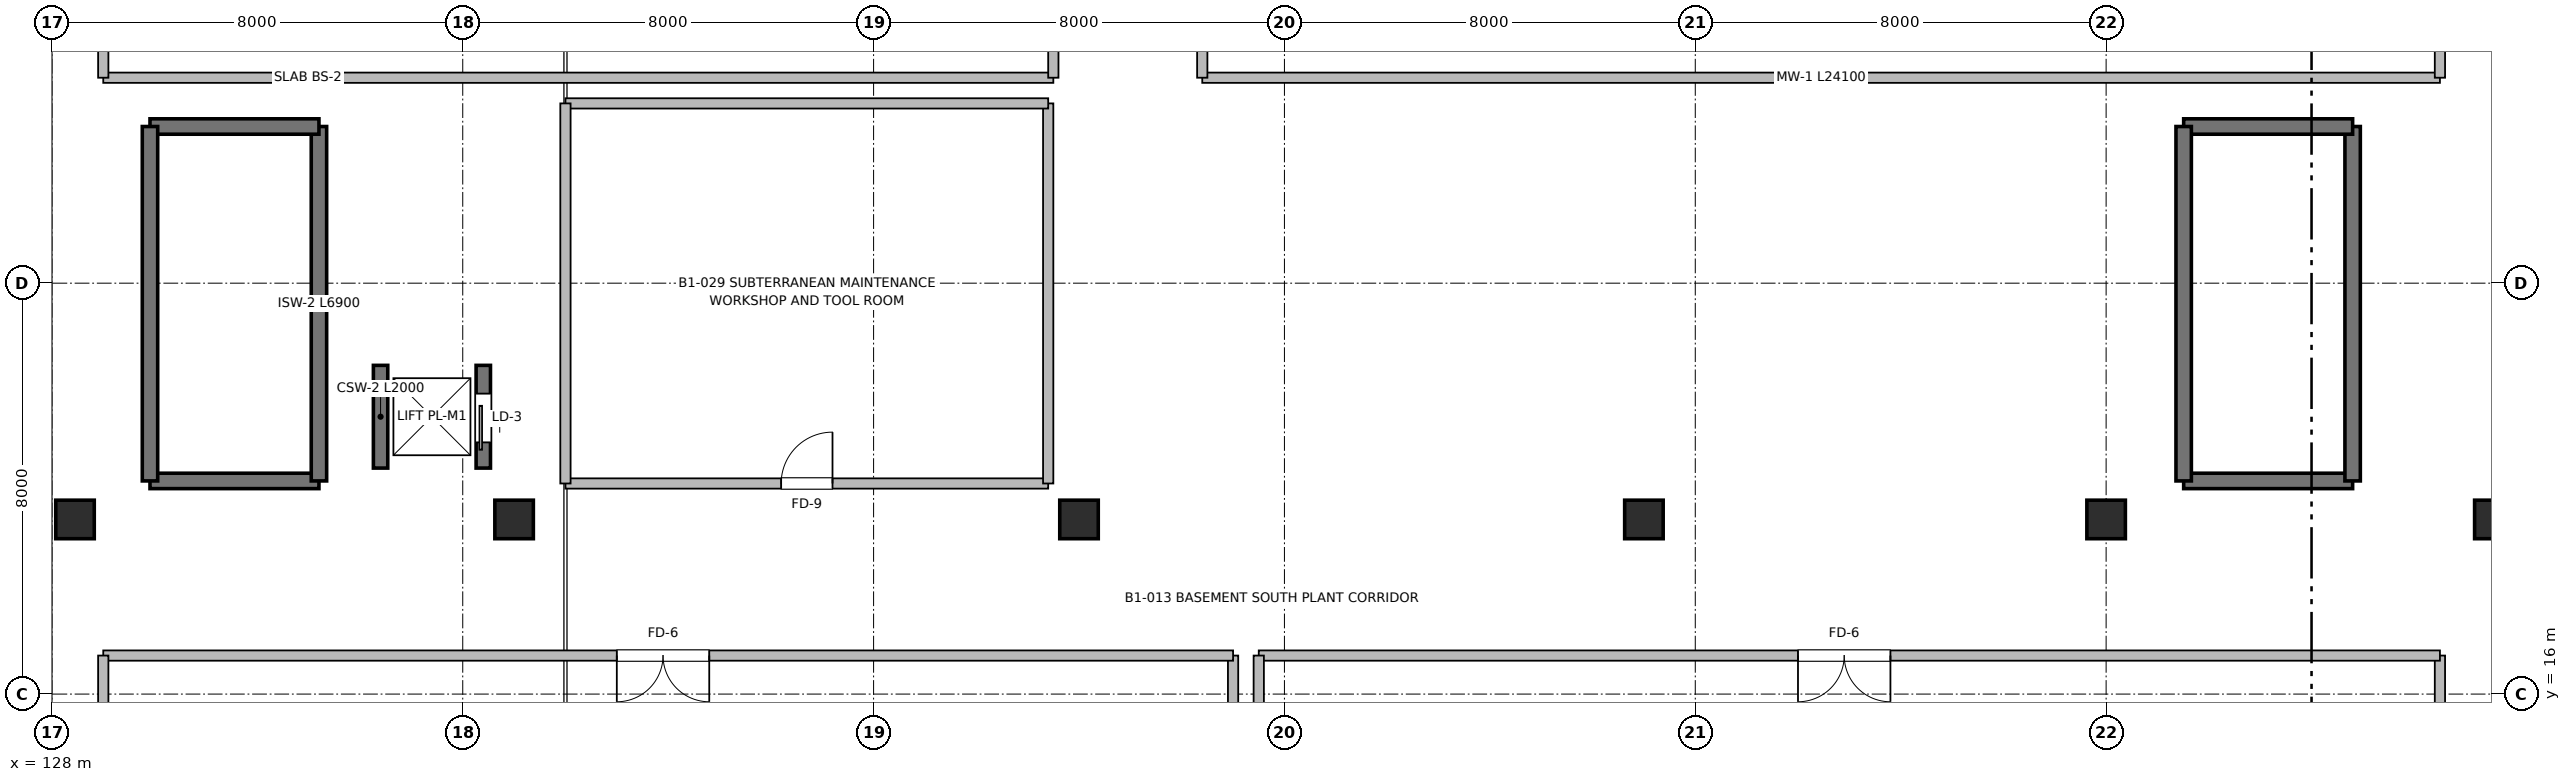
"""IFC4 building model, lengths in metres.
Left out: names, types, materials, properties, quantities, classifications, styles, units other than length and angle.
Written with IfcOpenShell. Run it as: python <this file> out.ifc"""

import sys

from ifc_helpers import new_model, si_unit, direction, frame, frame_2d, origin, origin_2d, place, context, subcontext, project, spatial, rectangle, extrude, element, fill, save


model = new_model("IFC4")
c1 = context("Model", 3, precision=1e-05, world=origin(), true_north=direction((0.0, 1.0)))
c2 = subcontext(c1, "Body", "Model", "MODEL_VIEW")
j1 = project(units=[si_unit("LENGTHUNIT", "METRE"), si_unit("PLANEANGLEUNIT", "RADIAN")], contexts=[c1])
p1 = place(None, origin())
s1 = spatial("IfcSite", under=j1, at=p1, CompositionType="ELEMENT")
p2 = place(p1, origin())
s2 = spatial("IfcBuilding", under=s1, at=p2, CompositionType="ELEMENT")
p3 = place(p2, frame((0.0, 0.0, -3.84)))
s3 = spatial("IfcBuildingStorey", under=s2, at=p3, CompositionType="ELEMENT", Elevation=-3.84)
for number, where, z_axis, x_axis in (
    (1, (128.45, 19.4, 0.0), (0.0, 0.0, 1.0), (1.0, 0.0, 0.0)),
    (2, (137.0, 19.4, 0.0), (0.0, 0.0, 1.0), (1.0, 0.0, 0.0)),
    (3, (148.0, 19.4, 0.0), (0.0, 0.0, 1.0), (1.0, 0.0, 0.0)),
    (4, (159.0, 19.4, 0.0), (0.0, 0.0, 1.0), (1.0, 0.0, 0.0)),
    (5, (168.0, 19.4, 0.0), (0.0, 0.0, 1.0), (1.0, 0.0, 0.0)),
    (6, (175.55, 19.4, 0.0), (0.0, 0.0, 1.0), (1.0, 0.0, 0.0)),
):
    element("IfcColumn", number, at=place(p3, frame(where, z_axis=z_axis, x_axis=x_axis)), inside=s3, PredefinedType="COLUMN", context=c2, shape_type="SweptSolid", body=[
        extrude(rectangle(XDim=0.75, YDim=0.75, at=origin_2d()), origin(), (0.0, 0.0, 1.0), 3.84),
    ])
p4 = place(p3, frame((136.4, 20.4, 0.0), z_axis=(0.0, 0.0, 1.0), x_axis=(0.0, 1.0, 0.0)))
e7 = element("IfcWall", 7, at=p4, inside=s3, PredefinedType="SHEAR", context=c2, shape_type="SweptSolid", body=[
    extrude(rectangle(XDim=2.0, YDim=0.28, at=frame_2d((1.0, 0.0))), origin(), (0.0, 0.0, 1.0), 3.52),
])
p5 = place(p4, frame((0.5, 0.0, 0.0)))
e8 = element("IfcOpeningElement", 8, at=p5, cuts=e7, PredefinedType="OPENING", context=c2, shape_type="SweptSolid", body=[
    extrude(rectangle(XDim=0.95, YDim=2.15, at=frame_2d((0.475, 1.075))), frame((0.0, 0.15, 0.0), z_axis=(0.0, -1.0, 0.0), x_axis=(1.0, 0.0, 0.0)), (0.0, 0.0, 1.0), 0.3),
])
p6 = place(p3, frame((134.4, 20.4, 0.0), z_axis=(0.0, 0.0, 1.0), x_axis=(0.0, 1.0, 0.0)))
e9 = element("IfcWall", 9, at=p6, inside=s3, PredefinedType="SHEAR", context=c2, shape_type="SweptSolid", body=[
    extrude(rectangle(XDim=2.0, YDim=0.28, at=frame_2d((1.0, 0.0))), origin(), (0.0, 0.0, 1.0), 3.52),
])
p7 = place(p3, frame((133.2, 20.15, 0.0), z_axis=(0.0, 0.0, 1.0), x_axis=(-1.0, 0.0, 0.0)))
e10 = element("IfcWall", 10, at=p7, inside=s3, PredefinedType="SHEAR", context=c2, shape_type="SweptSolid", body=[
    extrude(rectangle(XDim=3.29, YDim=0.3, at=frame_2d((1.645, 0.0))), origin(), (0.0, 0.0, 1.0), 3.84),
])
p8 = place(p3, frame((133.2, 27.05, 0.0), z_axis=(0.0, 0.0, 1.0), x_axis=(0.0, -1.0, 0.0)))
e11 = element("IfcWall", 11, at=p8, inside=s3, PredefinedType="SHEAR", context=c2, shape_type="SweptSolid", body=[
    extrude(rectangle(XDim=6.9, YDim=0.3, at=frame_2d((3.45, 0.0))), origin(), (0.0, 0.0, 1.0), 3.84),
])
p9 = place(p3, frame((129.91, 27.05, 0.0), z_axis=(0.0, 0.0, 1.0), x_axis=(1.0, 0.0, 0.0)))
e12 = element("IfcWall", 12, at=p9, inside=s3, PredefinedType="SHEAR", context=c2, shape_type="SweptSolid", body=[
    extrude(rectangle(XDim=3.29, YDim=0.3, at=frame_2d((1.645, 0.0))), origin(), (0.0, 0.0, 1.0), 3.84),
])
p10 = place(p3, frame((129.91, 20.15, 0.0), z_axis=(0.0, 0.0, 1.0), x_axis=(0.0, 1.0, 0.0)))
e13 = element("IfcWall", 13, at=p10, inside=s3, PredefinedType="SHEAR", context=c2, shape_type="SweptSolid", body=[
    extrude(rectangle(XDim=6.9, YDim=0.3, at=frame_2d((3.45, 0.0))), origin(), (0.0, 0.0, 1.0), 3.84),
])
p11 = place(p3, frame((172.8, 20.15, 0.0), z_axis=(0.0, 0.0, 1.0), x_axis=(-1.0, 0.0, 0.0)))
e14 = element("IfcWall", 14, at=p11, inside=s3, PredefinedType="SHEAR", context=c2, shape_type="SweptSolid", body=[
    extrude(rectangle(XDim=3.29, YDim=0.3, at=frame_2d((1.645, 0.0))), origin(), (0.0, 0.0, 1.0), 3.84),
])
p12 = place(p3, frame((172.8, 27.05, 0.0), z_axis=(0.0, 0.0, 1.0), x_axis=(0.0, -1.0, 0.0)))
e15 = element("IfcWall", 15, at=p12, inside=s3, PredefinedType="SHEAR", context=c2, shape_type="SweptSolid", body=[
    extrude(rectangle(XDim=6.9, YDim=0.3, at=frame_2d((3.45, 0.0))), origin(), (0.0, 0.0, 1.0), 3.84),
])
p13 = place(p3, frame((169.51, 27.05, 0.0), z_axis=(0.0, 0.0, 1.0), x_axis=(1.0, 0.0, 0.0)))
e16 = element("IfcWall", 16, at=p13, inside=s3, PredefinedType="SHEAR", context=c2, shape_type="SweptSolid", body=[
    extrude(rectangle(XDim=3.29, YDim=0.3, at=frame_2d((1.645, 0.0))), origin(), (0.0, 0.0, 1.0), 3.84),
])
p14 = place(p3, frame((169.51, 20.15, 0.0), z_axis=(0.0, 0.0, 1.0), x_axis=(0.0, 1.0, 0.0)))
e17 = element("IfcWall", 17, at=p14, inside=s3, PredefinedType="SHEAR", context=c2, shape_type="SweptSolid", body=[
    extrude(rectangle(XDim=6.9, YDim=0.3, at=frame_2d((3.45, 0.0))), origin(), (0.0, 0.0, 1.0), 3.84),
])
p15 = place(p3, frame((151.0, 1.5, 0.0), z_axis=(0.0, 0.0, 1.0), x_axis=(0.0, 1.0, 0.0)))
e18 = element("IfcWall", 18, at=p15, inside=s3, PredefinedType="SOLIDWALL", context=c2, shape_type="SweptSolid", body=[
    extrude(rectangle(XDim=15.25, YDim=0.2, at=frame_2d((7.625, 0.0))), origin(), (0.0, 0.0, 1.0), 3.52),
])
p16 = place(p3, frame((151.0, 16.75, 0.0), z_axis=(0.0, 0.0, 1.0), x_axis=(-1.0, 0.0, 0.0)))
e19 = element("IfcWall", 19, at=p16, inside=s3, PredefinedType="SOLIDWALL", context=c2, shape_type="SweptSolid", body=[
    extrude(rectangle(XDim=22.0, YDim=0.2, at=frame_2d((11.0, 0.0))), origin(), (0.0, 0.0, 1.0), 3.52),
])
p17 = place(p16, frame((10.2, 0.0, 0.0)))
e20 = element("IfcOpeningElement", 20, at=p17, cuts=e19, PredefinedType="OPENING", context=c2, shape_type="SweptSolid", body=[
    extrude(rectangle(XDim=1.8, YDim=2.25, at=frame_2d((0.9, 1.125))), frame((0.0, 0.11, 0.0), z_axis=(0.0, -1.0, 0.0), x_axis=(1.0, 0.0, 0.0)), (0.0, 0.0, 1.0), 0.22),
])
for number, where, z_axis, x_axis in (
    (21, (129.0, 16.75, 0.0), (0.0, 0.0, 1.0), (0.0, -1.0, 0.0)),
    (22, (174.5, 1.5, 0.0), (0.0, 0.0, 1.0), (0.0, 1.0, 0.0)),
):
    element("IfcWall", number, at=place(p3, frame(where, z_axis=z_axis, x_axis=x_axis)), inside=s3, PredefinedType="SOLIDWALL", context=c2, shape_type="SweptSolid", body=[
        extrude(rectangle(XDim=15.25, YDim=0.2, at=frame_2d((7.625, 0.0))), origin(), (0.0, 0.0, 1.0), 3.52),
    ])
p18 = place(p3, frame((174.5, 16.75, 0.0), z_axis=(0.0, 0.0, 1.0), x_axis=(-1.0, 0.0, 0.0)))
e23 = element("IfcWall", 23, at=p18, inside=s3, PredefinedType="SOLIDWALL", context=c2, shape_type="SweptSolid", body=[
    extrude(rectangle(XDim=23.0, YDim=0.2, at=frame_2d((11.5, 0.0))), origin(), (0.0, 0.0, 1.0), 3.52),
])
p19 = place(p18, frame((10.7, 0.0, 0.0)))
e24 = element("IfcOpeningElement", 24, at=p19, cuts=e23, PredefinedType="OPENING", context=c2, shape_type="SweptSolid", body=[
    extrude(rectangle(XDim=1.8, YDim=2.25, at=frame_2d((0.9, 1.125))), frame((0.0, 0.11, 0.0), z_axis=(0.0, -1.0, 0.0), x_axis=(1.0, 0.0, 0.0)), (0.0, 0.0, 1.0), 0.22),
])
p20 = place(p3, frame((151.5, 16.75, 0.0), z_axis=(0.0, 0.0, 1.0), x_axis=(0.0, -1.0, 0.0)))
e25 = element("IfcWall", 25, at=p20, inside=s3, PredefinedType="SOLIDWALL", context=c2, shape_type="SweptSolid", body=[
    extrude(rectangle(XDim=15.25, YDim=0.2, at=frame_2d((7.625, 0.0))), origin(), (0.0, 0.0, 1.0), 3.52),
])
p21 = place(p3, frame((150.4, 28.0, 0.0), z_axis=(0.0, 0.0, 1.0), x_axis=(1.0, 0.0, 0.0)))
e26 = element("IfcWall", 26, at=p21, inside=s3, PredefinedType="SOLIDWALL", context=c2, shape_type="SweptSolid", body=[
    extrude(rectangle(XDim=24.1, YDim=0.2, at=frame_2d((12.05, 0.0))), origin(), (0.0, 0.0, 1.0), 3.52),
])
for number, where, z_axis, x_axis in (
    (27, (174.5, 28.0, 0.0), (0.0, 0.0, 1.0), (0.0, 1.0, 0.0)),
    (28, (150.4, 54.0, 0.0), (0.0, 0.0, 1.0), (0.0, -1.0, 0.0)),
):
    element("IfcWall", number, at=place(p3, frame(where, z_axis=z_axis, x_axis=x_axis)), inside=s3, PredefinedType="SOLIDWALL", context=c2, shape_type="SweptSolid", body=[
        extrude(rectangle(XDim=26.0, YDim=0.2, at=frame_2d((13.0, 0.0))), origin(), (0.0, 0.0, 1.0), 3.52),
    ])
p22 = place(p3, frame((129.0, 28.0, 0.0), z_axis=(0.0, 0.0, 1.0), x_axis=(1.0, 0.0, 0.0)))
e29 = element("IfcWall", 29, at=p22, inside=s3, PredefinedType="SOLIDWALL", context=c2, shape_type="SweptSolid", body=[
    extrude(rectangle(XDim=18.5, YDim=0.2, at=frame_2d((9.25, 0.0))), origin(), (0.0, 0.0, 1.0), 3.52),
])
for number, where, z_axis, x_axis in (
    (30, (147.5, 28.0, 0.0), (0.0, 0.0, 1.0), (0.0, 1.0, 0.0)),
    (31, (129.0, 54.0, 0.0), (0.0, 0.0, 1.0), (0.0, -1.0, 0.0)),
):
    element("IfcWall", number, at=place(p3, frame(where, z_axis=z_axis, x_axis=x_axis)), inside=s3, PredefinedType="SOLIDWALL", context=c2, shape_type="SweptSolid", body=[
        extrude(rectangle(XDim=26.0, YDim=0.2, at=frame_2d((13.0, 0.0))), origin(), (0.0, 0.0, 1.0), 3.52),
    ])
p23 = place(p3, frame((138.0, 20.1, 0.0), z_axis=(0.0, 0.0, 1.0), x_axis=(1.0, 0.0, 0.0)))
e32 = element("IfcWall", 32, at=p23, inside=s3, PredefinedType="SOLIDWALL", context=c2, shape_type="SweptSolid", body=[
    extrude(rectangle(XDim=9.4, YDim=0.2, at=frame_2d((4.7, 0.0))), origin(), (0.0, 0.0, 1.0), 3.52),
])
p24 = place(p23, frame((4.2, 0.0, 0.0)))
e33 = element("IfcOpeningElement", 33, at=p24, cuts=e32, PredefinedType="OPENING", context=c2, shape_type="SweptSolid", body=[
    extrude(rectangle(XDim=1.0, YDim=2.1, at=frame_2d((0.5, 1.05))), frame((0.0, 0.11, 0.0), z_axis=(0.0, -1.0, 0.0), x_axis=(1.0, 0.0, 0.0)), (0.0, 0.0, 1.0), 0.22),
])
p25 = place(p3, frame((147.4, 20.1, 0.0), z_axis=(0.0, 0.0, 1.0), x_axis=(0.0, 1.0, 0.0)))
e34 = element("IfcWall", 34, at=p25, inside=s3, PredefinedType="SOLIDWALL", context=c2, shape_type="SweptSolid", body=[
    extrude(rectangle(XDim=7.4, YDim=0.2, at=frame_2d((3.7, 0.0))), origin(), (0.0, 0.0, 1.0), 3.52),
])
p26 = place(p3, frame((147.4, 27.5, 0.0), z_axis=(0.0, 0.0, 1.0), x_axis=(-1.0, 0.0, 0.0)))
e35 = element("IfcWall", 35, at=p26, inside=s3, PredefinedType="SOLIDWALL", context=c2, shape_type="SweptSolid", body=[
    extrude(rectangle(XDim=9.4, YDim=0.2, at=frame_2d((4.7, 0.0))), origin(), (0.0, 0.0, 1.0), 3.52),
])
p27 = place(p3, frame((138.0, 27.5, 0.0), z_axis=(0.0, 0.0, 1.0), x_axis=(0.0, -1.0, 0.0)))
e36 = element("IfcWall", 36, at=p27, inside=s3, PredefinedType="SOLIDWALL", context=c2, shape_type="SweptSolid", body=[
    extrude(rectangle(XDim=7.4, YDim=0.2, at=frame_2d((3.7, 0.0))), origin(), (0.0, 0.0, 1.0), 3.52),
])
p28 = place(p5, origin())
e37 = element("IfcDoor", 37, at=p28, inside=s3, OperationType="SLIDING_TO_LEFT", PredefinedType="DOOR", context=c2, shape_type="SweptSolid", body=[
    extrude(rectangle(XDim=0.95, YDim=2.15, at=frame_2d((0.475, 1.075))), frame((0.0, 0.025, 0.0), z_axis=(0.0, -1.0, 0.0), x_axis=(1.0, 0.0, 0.0)), (0.0, 0.0, 1.0), 0.05),
])
fill(e8, e37)
p29 = place(p17, origin())
e38 = element("IfcDoor", 38, at=p29, inside=s3, OperationType="DOUBLE_DOOR_SINGLE_SWING", PredefinedType="DOOR", context=c2, shape_type="SweptSolid", body=[
    extrude(rectangle(XDim=1.8, YDim=2.25, at=frame_2d((0.9, 1.125))), frame((0.0, 0.025, 0.0), z_axis=(0.0, -1.0, 0.0), x_axis=(1.0, 0.0, 0.0)), (0.0, 0.0, 1.0), 0.05),
])
fill(e20, e38)
p30 = place(p19, origin())
e39 = element("IfcDoor", 39, at=p30, inside=s3, OperationType="DOUBLE_DOOR_SINGLE_SWING", PredefinedType="DOOR", context=c2, shape_type="SweptSolid", body=[
    extrude(rectangle(XDim=1.8, YDim=2.25, at=frame_2d((0.9, 1.125))), frame((0.0, 0.025, 0.0), z_axis=(0.0, -1.0, 0.0), x_axis=(1.0, 0.0, 0.0)), (0.0, 0.0, 1.0), 0.05),
])
fill(e24, e39)
p31 = place(p24, origin())
e40 = element("IfcDoor", 40, at=p31, inside=s3, OperationType="SINGLE_SWING_RIGHT", PredefinedType="DOOR", context=c2, shape_type="SweptSolid", body=[
    extrude(rectangle(XDim=1.0, YDim=2.1, at=frame_2d((0.5, 1.05))), frame((0.0, 0.025, 0.0), z_axis=(0.0, -1.0, 0.0), x_axis=(1.0, 0.0, 0.0)), (0.0, 0.0, 1.0), 0.05),
])
fill(e33, e40)
save(model, sys.argv[1])
